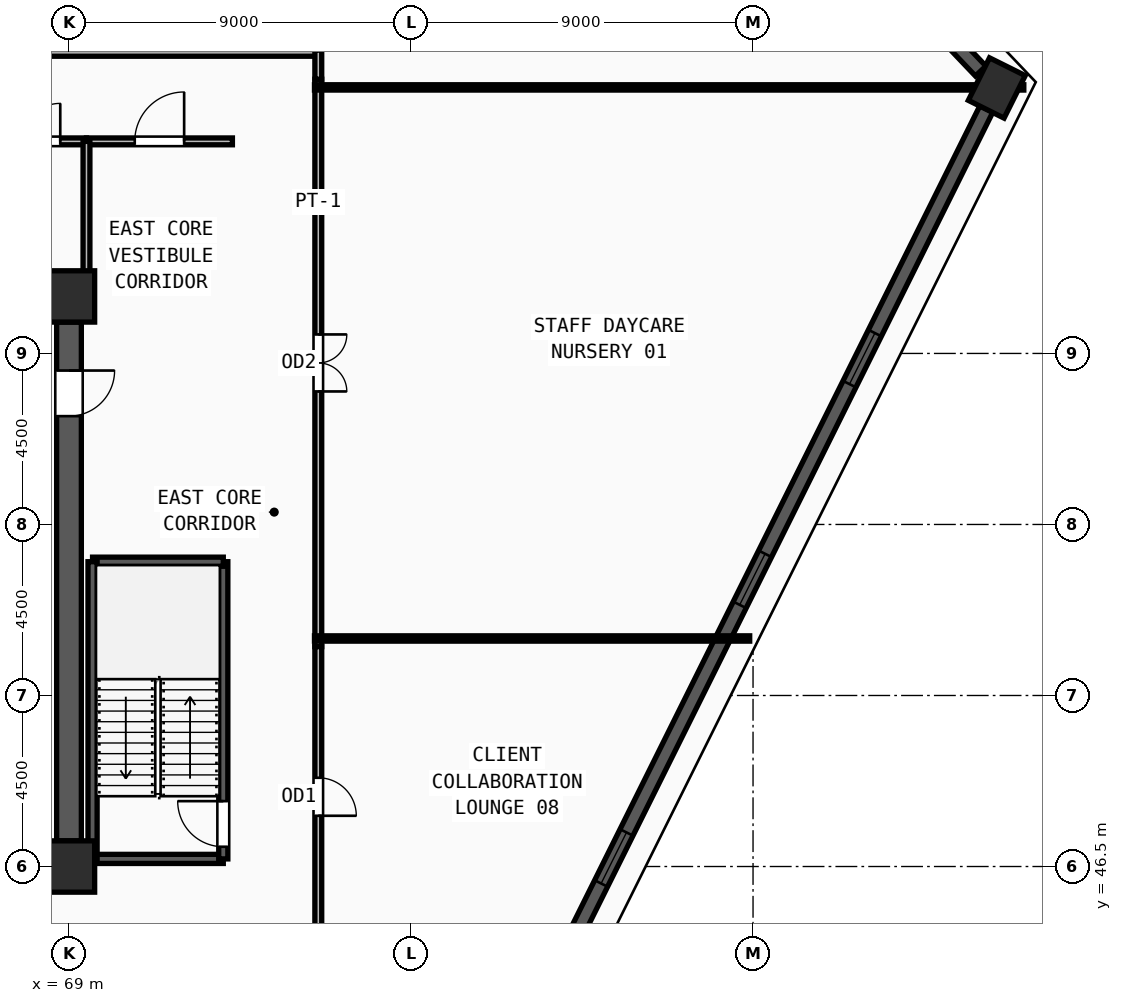
"""IFC4 building model, lengths in metres.
Left out: names, types, materials, properties, quantities, classifications, styles, units other than length and angle.
Written with IfcOpenShell. Run it as: python <this file> out.ifc"""

import sys

from ifc_helpers import new_model, si_unit, direction, frame, frame_2d, origin, origin_2d, place, context, subcontext, project, spatial, rectangle, extrude, source, transform, mapped, element, fill, save


model = new_model("IFC4")
c1 = context("Model", 3, precision=1e-05, world=origin(), true_north=direction((0.0, 1.0)))
c2 = subcontext(c1, "Body", "Model", "MODEL_VIEW")
j1 = project(units=[si_unit("LENGTHUNIT", "METRE"), si_unit("PLANEANGLEUNIT", "RADIAN")], contexts=[c1])
p1 = place(None, origin())
s1 = spatial("IfcSite", under=j1, at=p1, CompositionType="ELEMENT")
p2 = place(p1, origin())
s2 = spatial("IfcBuilding", under=s1, at=p2, CompositionType="ELEMENT")
p3 = place(p2, frame((0.0, 0.0, 213.0)))
s3 = spatial("IfcBuildingStorey", under=s2, at=p3, CompositionType="ELEMENT", Elevation=213.0)
m1 = source(origin(), c2, "Body", "SweptSolid", [
    extrude(rectangle(XDim=1.35, YDim=1.35, at=origin_2d()), origin(), (0.0, 0.0, 1.0), 3.75),
])
for number, where, z_axis, x_axis in (
    (1, (69.0, 46.5, 0.0), (0.0, 0.0, 1.0), (1.0, 0.0, 0.0)),
    (2, (69.0, 61.5, 0.0), (0.0, 0.0, 1.0), (1.0, 0.0, 0.0)),
):
    element("IfcColumn", number, at=place(p3, frame(where, z_axis=z_axis, x_axis=x_axis)), inside=s3, PredefinedType="COLUMN", context=c2, shape_type="MappedRepresentation", body=[
        mapped(m1, transform((0.0, 0.0, 0.0), x_axis=(1.0, 0.0, 0.0), y_axis=(0.0, 1.0, 0.0), z_axis=(0.0, 0.0, 1.0), scale=1.0)),
    ])
m2 = source(origin(), c2, "Body", "SweptSolid", [
    extrude(rectangle(XDim=1.25, YDim=1.05, at=origin_2d()), origin(), (0.0, 0.0, 1.0), 3.75),
])
p4 = place(p3, frame((93.414, 66.985, 0.0), z_axis=(0.0, 0.0, 1.0), x_axis=(0.445416665749, 0.895323401835, 0.0)))
e3 = element("IfcColumn", 3, at=p4, inside=s3, PredefinedType="COLUMN", context=c2, shape_type="MappedRepresentation", body=[
    mapped(m2, transform((0.0, 0.0, 0.0), x_axis=(1.0, 0.0, 0.0), y_axis=(0.0, 1.0, 0.0), z_axis=(0.0, 0.0, 1.0), scale=1.0)),
])
p5 = place(p3, frame((80.069, 40.156, 0.0), z_axis=(0.0, 0.0, 1.0), x_axis=(0.445352625388, 0.895355258576, 0.0)))
e4 = element("IfcWall", 4, at=p5, inside=s3, PredefinedType="SOLIDWALL", context=c2, shape_type="SweptSolid", body=[
    extrude(rectangle(XDim=29.349, YDim=0.38, at=frame_2d((14.675, 0.0))), origin(), (0.0, 0.0, 1.0), 3.57),
])
m3 = source(origin(), c2, "Body", "SweptSolid", [
    extrude(rectangle(XDim=1.5, YDim=1.9, at=frame_2d((0.75, 0.95))), frame((0.0, 0.2, 0.0), z_axis=(0.0, -1.0, 0.0), x_axis=(1.0, 0.0, 0.0)), (0.0, 0.0, 1.0), 0.4),
])
p6 = place(p5, frame((6.587, 0.0, 0.55)))
e5 = element("IfcOpeningElement", 5, at=p6, cuts=e4, PredefinedType="OPENING", context=c2, shape_type="MappedRepresentation", body=[
    mapped(m3, transform((0.0, 0.0, 0.0), x_axis=(1.0, 0.0, 0.0), y_axis=(0.0, 1.0, 0.0), z_axis=(0.0, 0.0, 1.0), scale=1.0)),
])
p7 = place(p5, frame((14.775, 0.0, 0.55)))
e6 = element("IfcOpeningElement", 6, at=p7, cuts=e4, PredefinedType="OPENING", context=c2, shape_type="MappedRepresentation", body=[
    mapped(m3, transform((0.0, 0.0, 0.0), x_axis=(1.0, 0.0, 0.0), y_axis=(0.0, 1.0, 0.0), z_axis=(0.0, 0.0, 1.0), scale=1.0)),
])
p8 = place(p5, frame((21.262, 0.0, 0.55)))
e7 = element("IfcOpeningElement", 7, at=p8, cuts=e4, PredefinedType="OPENING", context=c2, shape_type="MappedRepresentation", body=[
    mapped(m3, transform((0.0, 0.0, 0.0), x_axis=(1.0, 0.0, 0.0), y_axis=(0.0, 1.0, 0.0), z_axis=(0.0, 0.0, 1.0), scale=1.0)),
])
p9 = place(p3, frame((92.99, 67.431, 0.0), z_axis=(0.0, 0.0, 1.0), x_axis=(-0.689446721654, 0.724336398368, 0.0)))
e8 = element("IfcWall", 8, at=p9, inside=s3, PredefinedType="SOLIDWALL", context=c2, shape_type="SweptSolid", body=[
    extrude(rectangle(XDim=4.387, YDim=0.38, at=frame_2d((2.194, 0.0))), origin(), (0.0, 0.0, 1.0), 3.57),
])
m4 = source(origin(), c2, "Body", "SweptSolid", [
    extrude(rectangle(XDim=1.2, YDim=1.9, at=frame_2d((0.6, 0.95))), frame((0.0, 0.2, 0.0), z_axis=(0.0, -1.0, 0.0), x_axis=(1.0, 0.0, 0.0)), (0.0, 0.0, 1.0), 0.4),
])
p10 = place(p9, frame((1.594, 0.0, 0.55)))
e9 = element("IfcOpeningElement", 9, at=p10, cuts=e8, PredefinedType="OPENING", context=c2, shape_type="MappedRepresentation", body=[
    mapped(m4, transform((0.0, 0.0, 0.0), x_axis=(1.0, 0.0, 0.0), y_axis=(0.0, 1.0, 0.0), z_axis=(0.0, 0.0, 1.0), scale=1.0)),
])
p11 = place(p3, frame((69.0, 60.825, 0.0), z_axis=(0.0, 0.0, 1.0), x_axis=(0.0, -1.0, 0.0)))
e10 = element("IfcWall", 10, at=p11, inside=s3, PredefinedType="SHEAR", context=c2, shape_type="SweptSolid", body=[
    extrude(rectangle(XDim=13.65, YDim=0.65, at=frame_2d((6.825, 0.0))), origin(), (0.0, 0.0, 1.0), 3.57),
])
m5 = source(origin(), c2, "Body", "SweptSolid", [
    extrude(rectangle(XDim=1.2, YDim=2.2, at=frame_2d((0.6, 1.1))), frame((0.0, 0.335, 0.0), z_axis=(0.0, -1.0, 0.0), x_axis=(1.0, 0.0, 0.0)), (0.0, 0.0, 1.0), 0.67),
])
p12 = place(p11, frame((1.275, 0.0, 0.0)))
e11 = element("IfcOpeningElement", 11, at=p12, cuts=e10, PredefinedType="OPENING", context=c2, shape_type="MappedRepresentation", body=[
    mapped(m5, transform((0.0, 0.0, 0.0), x_axis=(1.0, 0.0, 0.0), y_axis=(0.0, 1.0, 0.0), z_axis=(0.0, 0.0, 1.0), scale=1.0)),
])
p13 = place(p3, frame((69.62, 46.7, 0.0), z_axis=(0.0, 0.0, 1.0), x_axis=(1.0, 0.0, 0.0)))
e12 = element("IfcWall", 12, at=p13, inside=s3, PredefinedType="SOLIDWALL", context=c2, shape_type="SweptSolid", body=[
    extrude(rectangle(XDim=3.44, YDim=0.24, at=frame_2d((1.72, 0.0))), origin(), (0.0, 0.0, 1.0), 3.57),
])
p14 = place(p3, frame((73.06, 46.7, 0.0), z_axis=(0.0, 0.0, 1.0), x_axis=(0.0, 1.0, 0.0)))
e13 = element("IfcWall", 13, at=p14, inside=s3, PredefinedType="SOLIDWALL", context=c2, shape_type="SweptSolid", body=[
    extrude(rectangle(XDim=7.82, YDim=0.24, at=frame_2d((3.91, 0.0))), origin(), (0.0, 0.0, 1.0), 3.57),
])
m6 = source(origin(), c2, "Body", "SweptSolid", [
    extrude(rectangle(XDim=1.2, YDim=2.2, at=frame_2d((0.6, 1.1))), frame((0.0, 0.13, 0.0), z_axis=(0.0, -1.0, 0.0), x_axis=(1.0, 0.0, 0.0)), (0.0, 0.0, 1.0), 0.26),
])
p15 = place(p14, frame((0.32, 0.0, 0.0)))
e14 = element("IfcOpeningElement", 14, at=p15, cuts=e13, PredefinedType="OPENING", context=c2, shape_type="MappedRepresentation", body=[
    mapped(m6, transform((0.0, 0.0, 0.0), x_axis=(1.0, 0.0, 0.0), y_axis=(0.0, 1.0, 0.0), z_axis=(0.0, 0.0, 1.0), scale=1.0)),
])
p16 = place(p3, frame((73.06, 54.52, 0.0), z_axis=(0.0, 0.0, 1.0), x_axis=(-1.0, 0.0, 0.0)))
e15 = element("IfcWall", 15, at=p16, inside=s3, PredefinedType="SOLIDWALL", context=c2, shape_type="SweptSolid", body=[
    extrude(rectangle(XDim=3.44, YDim=0.24, at=frame_2d((1.72, 0.0))), origin(), (0.0, 0.0, 1.0), 3.57),
])
p17 = place(p3, frame((69.62, 54.52, 0.0), z_axis=(0.0, 0.0, 1.0), x_axis=(0.0, -1.0, 0.0)))
e16 = element("IfcWall", 16, at=p17, inside=s3, PredefinedType="SOLIDWALL", context=c2, shape_type="SweptSolid", body=[
    extrude(rectangle(XDim=7.82, YDim=0.24, at=frame_2d((3.91, 0.0))), origin(), (0.0, 0.0, 1.0), 3.57),
])
p18 = place(p3, frame((67.08, 65.58, 0.0), z_axis=(0.0, 0.0, 1.0), x_axis=(1.0, 0.0, 0.0)))
e17 = element("IfcWall", 17, at=p18, inside=s3, PredefinedType="PARTITIONING", context=c2, shape_type="SweptSolid", body=[
    extrude(rectangle(XDim=2.38, YDim=0.18, at=frame_2d((1.19, 0.0))), origin(), (0.0, 0.0, 1.0), 3.57),
])
m7 = source(origin(), c2, "Body", "SweptSolid", [
    extrude(rectangle(XDim=1.0, YDim=2.2, at=frame_2d((0.5, 1.1))), frame((0.0, 0.1, 0.0), z_axis=(0.0, -1.0, 0.0), x_axis=(1.0, 0.0, 0.0)), (0.0, 0.0, 1.0), 0.2),
])
p19 = place(p18, frame((0.69, 0.0, 0.0)))
e18 = element("IfcOpeningElement", 18, at=p19, cuts=e17, PredefinedType="OPENING", context=c2, shape_type="MappedRepresentation", body=[
    mapped(m7, transform((0.0, 0.0, 0.0), x_axis=(1.0, 0.0, 0.0), y_axis=(0.0, 1.0, 0.0), z_axis=(0.0, 0.0, 1.0), scale=1.0)),
])
p20 = place(p3, frame((69.46, 65.58, 0.0), z_axis=(0.0, 0.0, 1.0), x_axis=(1.0, 0.0, 0.0)))
e19 = element("IfcWall", 19, at=p20, inside=s3, PredefinedType="PARTITIONING", context=c2, shape_type="SweptSolid", body=[
    extrude(rectangle(XDim=3.84, YDim=0.18, at=frame_2d((1.92, 0.0))), origin(), (0.0, 0.0, 1.0), 3.57),
])
m8 = source(origin(), c2, "Body", "SweptSolid", [
    extrude(rectangle(XDim=1.3, YDim=2.2, at=frame_2d((0.65, 1.1))), frame((0.0, 0.1, 0.0), z_axis=(0.0, -1.0, 0.0), x_axis=(1.0, 0.0, 0.0)), (0.0, 0.0, 1.0), 0.2),
])
p21 = place(p20, frame((1.27, 0.0, 0.0)))
e20 = element("IfcOpeningElement", 20, at=p21, cuts=e19, PredefinedType="OPENING", context=c2, shape_type="MappedRepresentation", body=[
    mapped(m8, transform((0.0, 0.0, 0.0), x_axis=(1.0, 0.0, 0.0), y_axis=(0.0, 1.0, 0.0), z_axis=(0.0, 0.0, 1.0), scale=1.0)),
])
p22 = place(p3, frame((75.56, 67.215, 0.0), z_axis=(0.0, 0.0, 1.0), x_axis=(0.0, -1.0, 0.0)))
e21 = element("IfcWall", 21, at=p22, inside=s3, PredefinedType="PARTITIONING", context=c2, shape_type="SweptSolid", body=[
    extrude(rectangle(XDim=14.93, YDim=0.18, at=frame_2d((7.465, 0.0))), origin(), (0.0, 0.0, 1.0), 3.57),
])
m9 = source(origin(), c2, "Body", "SweptSolid", [
    extrude(rectangle(XDim=1.5, YDim=2.2, at=frame_2d((0.75, 1.1))), frame((0.0, 0.1, 0.0), z_axis=(0.0, -1.0, 0.0), x_axis=(1.0, 0.0, 0.0)), (0.0, 0.0, 1.0), 0.2),
])
p23 = place(p22, frame((6.715, 0.0, 0.0)))
e22 = element("IfcOpeningElement", 22, at=p23, cuts=e21, PredefinedType="OPENING", context=c2, shape_type="MappedRepresentation", body=[
    mapped(m9, transform((0.0, 0.0, 0.0), x_axis=(1.0, 0.0, 0.0), y_axis=(0.0, 1.0, 0.0), z_axis=(0.0, 0.0, 1.0), scale=1.0)),
])
p24 = place(p3, frame((75.56, 52.285, 0.0), z_axis=(0.0, 0.0, 1.0), x_axis=(0.0, -1.0, 0.0)))
e23 = element("IfcWall", 23, at=p24, inside=s3, PredefinedType="PARTITIONING", context=c2, shape_type="SweptSolid", body=[
    extrude(rectangle(XDim=7.9, YDim=0.18, at=frame_2d((3.95, 0.0))), origin(), (0.0, 0.0, 1.0), 3.57),
])
p25 = place(p24, frame((3.45, 0.0, 0.0)))
e24 = element("IfcOpeningElement", 24, at=p25, cuts=e23, PredefinedType="OPENING", context=c2, shape_type="MappedRepresentation", body=[
    mapped(m7, transform((0.0, 0.0, 0.0), x_axis=(1.0, 0.0, 0.0), y_axis=(0.0, 1.0, 0.0), z_axis=(0.0, 0.0, 1.0), scale=1.0)),
])
p26 = place(p3, frame((69.46, 61.95, 0.0), z_axis=(0.0, 0.0, 1.0), x_axis=(0.0, 1.0, 0.0)))
e25 = element("IfcWall", 25, at=p26, inside=s3, PredefinedType="PARTITIONING", context=c2, shape_type="SweptSolid", body=[
    extrude(rectangle(XDim=3.63, YDim=0.18, at=frame_2d((1.815, 0.0))), origin(), (0.0, 0.0, 1.0), 3.57),
])
p27 = place(p3, frame((65.39, 67.91, 0.0), z_axis=(0.0, 0.0, 1.0), x_axis=(1.0, 0.0, 0.0)))
e26 = element("IfcWall", 26, at=p27, inside=s3, PredefinedType="PARTITIONING", context=c2, shape_type="SweptSolid", body=[
    extrude(rectangle(XDim=10.24, YDim=0.18, at=frame_2d((5.12, 0.0))), origin(), (0.0, 0.0, 1.0), 3.57),
])
p28 = place(p3, frame((75.56, 67.98, 0.0), z_axis=(0.0, 0.0, 1.0), x_axis=(0.0, -1.0, 0.0)))
e27 = element("IfcWall", 27, at=p28, inside=s3, PredefinedType="PARTITIONING", context=c2, shape_type="SweptSolid", body=[
    extrude(rectangle(XDim=0.765, YDim=0.18, at=frame_2d((0.382, 0.0))), origin(), (0.0, 0.0, 1.0), 3.57),
])
p29 = place(p3, frame((75.46, 52.5, 0.0), z_axis=(0.0, 0.0, 1.0), x_axis=(1.0, 0.0, 0.0)))
e28 = element("IfcWall", 28, at=p29, inside=s3, PredefinedType="PARTITIONING", context=c2, shape_type="SweptSolid", body=[
    extrude(rectangle(XDim=11.452, YDim=0.14, at=frame_2d((5.726, 0.0))), origin(), (0.0, 0.0, 1.0), 3.57),
])
p30 = place(p3, frame((75.46, 67.0, 0.0), z_axis=(0.0, 0.0, 1.0), x_axis=(1.0, 0.0, 0.0)))
e29 = element("IfcWall", 29, at=p30, inside=s3, PredefinedType="PARTITIONING", context=c2, shape_type="SweptSolid", body=[
    extrude(rectangle(XDim=18.665, YDim=0.14, at=frame_2d((9.333, 0.0))), origin(), (0.0, 0.0, 1.0), 2.855),
])
m10 = source(origin(), c2, "Body", "SweptSolid", [
    extrude(rectangle(XDim=1.5, YDim=1.9, at=frame_2d((0.75, 0.95))), frame((0.0, 0.03, 0.0), z_axis=(0.0, -1.0, 0.0), x_axis=(1.0, 0.0, 0.0)), (0.0, 0.0, 1.0), 0.06),
])
p31 = place(p6, origin())
e30 = element("IfcWindow", 30, at=p31, inside=s3, PartitioningType="DOUBLE_PANEL_VERTICAL", PredefinedType="WINDOW", context=c2, shape_type="MappedRepresentation", body=[
    mapped(m10, transform((0.0, 0.0, 0.0), x_axis=(1.0, 0.0, 0.0), y_axis=(0.0, 1.0, 0.0), z_axis=(0.0, 0.0, 1.0), scale=1.0)),
])
fill(e5, e30)
p32 = place(p7, origin())
e31 = element("IfcWindow", 31, at=p32, inside=s3, PartitioningType="DOUBLE_PANEL_VERTICAL", PredefinedType="WINDOW", context=c2, shape_type="MappedRepresentation", body=[
    mapped(m10, transform((0.0, 0.0, 0.0), x_axis=(1.0, 0.0, 0.0), y_axis=(0.0, 1.0, 0.0), z_axis=(0.0, 0.0, 1.0), scale=1.0)),
])
fill(e6, e31)
p33 = place(p8, origin())
e32 = element("IfcWindow", 32, at=p33, inside=s3, PartitioningType="DOUBLE_PANEL_VERTICAL", PredefinedType="WINDOW", context=c2, shape_type="MappedRepresentation", body=[
    mapped(m10, transform((0.0, 0.0, 0.0), x_axis=(1.0, 0.0, 0.0), y_axis=(0.0, 1.0, 0.0), z_axis=(0.0, 0.0, 1.0), scale=1.0)),
])
fill(e7, e32)
m11 = source(origin(), c2, "Body", "SweptSolid", [
    extrude(rectangle(XDim=1.2, YDim=2.2, at=frame_2d((0.6, 1.1))), frame((0.0, 0.025, 0.0), z_axis=(0.0, -1.0, 0.0), x_axis=(1.0, 0.0, 0.0)), (0.0, 0.0, 1.0), 0.05),
])
p34 = place(p12, origin())
e33 = element("IfcDoor", 33, at=p34, inside=s3, OperationType="SINGLE_SWING_LEFT", PredefinedType="DOOR", context=c2, shape_type="MappedRepresentation", body=[
    mapped(m11, transform((0.0, 0.0, 0.0), x_axis=(1.0, 0.0, 0.0), y_axis=(0.0, 1.0, 0.0), z_axis=(0.0, 0.0, 1.0), scale=1.0)),
])
fill(e11, e33)
p35 = place(p15, origin())
e34 = element("IfcDoor", 34, at=p35, inside=s3, OperationType="SINGLE_SWING_RIGHT", PredefinedType="DOOR", context=c2, shape_type="MappedRepresentation", body=[
    mapped(m11, transform((0.0, 0.0, 0.0), x_axis=(1.0, 0.0, 0.0), y_axis=(0.0, 1.0, 0.0), z_axis=(0.0, 0.0, 1.0), scale=1.0)),
])
fill(e14, e34)
m12 = source(origin(), c2, "Body", "SweptSolid", [
    extrude(rectangle(XDim=1.0, YDim=2.2, at=frame_2d((0.5, 1.1))), frame((0.0, 0.025, 0.0), z_axis=(0.0, -1.0, 0.0), x_axis=(1.0, 0.0, 0.0)), (0.0, 0.0, 1.0), 0.05),
])
p36 = place(p19, origin())
e35 = element("IfcDoor", 35, at=p36, inside=s3, OperationType="SINGLE_SWING_RIGHT", PredefinedType="DOOR", context=c2, shape_type="MappedRepresentation", body=[
    mapped(m12, transform((0.0, 0.0, 0.0), x_axis=(1.0, 0.0, 0.0), y_axis=(0.0, 1.0, 0.0), z_axis=(0.0, 0.0, 1.0), scale=1.0)),
])
fill(e18, e35)
m13 = source(origin(), c2, "Body", "SweptSolid", [
    extrude(rectangle(XDim=1.3, YDim=2.2, at=frame_2d((0.65, 1.1))), frame((0.0, 0.025, 0.0), z_axis=(0.0, -1.0, 0.0), x_axis=(1.0, 0.0, 0.0)), (0.0, 0.0, 1.0), 0.05),
])
p37 = place(p21, origin())
e36 = element("IfcDoor", 36, at=p37, inside=s3, OperationType="SINGLE_SWING_RIGHT", PredefinedType="DOOR", context=c2, shape_type="MappedRepresentation", body=[
    mapped(m13, transform((0.0, 0.0, 0.0), x_axis=(1.0, 0.0, 0.0), y_axis=(0.0, 1.0, 0.0), z_axis=(0.0, 0.0, 1.0), scale=1.0)),
])
fill(e20, e36)
m14 = source(origin(), c2, "Body", "SweptSolid", [
    extrude(rectangle(XDim=1.5, YDim=2.2, at=frame_2d((0.75, 1.1))), frame((0.0, 0.025, 0.0), z_axis=(0.0, -1.0, 0.0), x_axis=(1.0, 0.0, 0.0)), (0.0, 0.0, 1.0), 0.05),
])
p38 = place(p23, origin())
e37 = element("IfcDoor", 37, at=p38, inside=s3, OperationType="DOUBLE_DOOR_SINGLE_SWING", PredefinedType="DOOR", context=c2, shape_type="MappedRepresentation", body=[
    mapped(m14, transform((0.0, 0.0, 0.0), x_axis=(1.0, 0.0, 0.0), y_axis=(0.0, 1.0, 0.0), z_axis=(0.0, 0.0, 1.0), scale=1.0)),
])
fill(e22, e37)
p39 = place(p25, origin())
e38 = element("IfcDoor", 38, at=p39, inside=s3, OperationType="SINGLE_SWING_RIGHT", PredefinedType="DOOR", context=c2, shape_type="MappedRepresentation", body=[
    mapped(m12, transform((0.0, 0.0, 0.0), x_axis=(1.0, 0.0, 0.0), y_axis=(0.0, 1.0, 0.0), z_axis=(0.0, 0.0, 1.0), scale=1.0)),
])
fill(e24, e38)
save(model, sys.argv[1])
